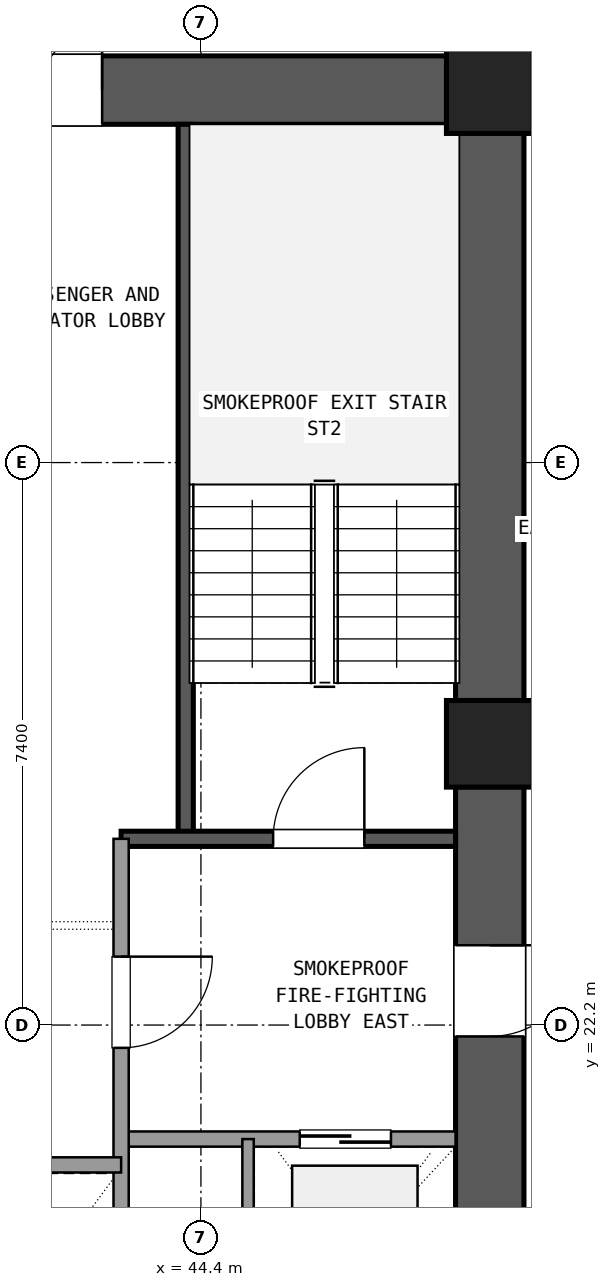
"""IFC4 building model, lengths in metres.
Left out: names, types, materials, properties, quantities, classifications, styles, units other than length and angle.
Written with IfcOpenShell. Run it as: python <this file> out.ifc"""

import sys

from ifc_helpers import new_model, si_unit, direction, frame, frame_2d, origin, origin_2d, place, context, subcontext, project, spatial, rectangle, extrude, element, fill, save


model = new_model("IFC4")
c1 = context("Model", 3, precision=1e-05, world=origin(), true_north=direction((0.0, 1.0)))
c2 = subcontext(c1, "Body", "Model", "MODEL_VIEW")
j1 = project(units=[si_unit("LENGTHUNIT", "METRE"), si_unit("PLANEANGLEUNIT", "RADIAN")], contexts=[c1])
p1 = place(None, origin())
s1 = spatial("IfcSite", under=j1, at=p1, CompositionType="ELEMENT")
p2 = place(p1, origin())
s2 = spatial("IfcBuilding", under=s1, at=p2, CompositionType="ELEMENT")
p3 = place(p2, frame((0.0, 0.0, 49.14)))
s3 = spatial("IfcBuildingStorey", under=s2, at=p3, CompositionType="ELEMENT", Elevation=49.14)
for number, where, z_axis, x_axis in (
    (1, (48.2, 25.9, 0.0), (0.0, 0.0, 1.0), (1.0, 0.0, 0.0)),
    (2, (48.2, 34.5, 0.0), (0.0, 0.0, 1.0), (1.0, 0.0, 0.0)),
):
    element("IfcColumn", number, at=place(p3, frame(where, z_axis=z_axis, x_axis=x_axis)), inside=s3, PredefinedType="COLUMN", context=c2, shape_type="SweptSolid", body=[
        extrude(rectangle(XDim=1.14, YDim=1.14, at=origin_2d()), origin(), (0.0, 0.0, 1.0), 3.6),
    ])
p4 = place(p3, frame((48.2, 17.865, 0.0), z_axis=(0.0, 0.0, 1.0), x_axis=(0.0, 1.0, 0.0)))
e3 = element("IfcWall", 3, at=p4, inside=s3, PredefinedType="SHEAR", context=c2, shape_type="SweptSolid", body=[
    extrude(rectangle(XDim=7.47, YDim=0.9, at=frame_2d((3.735, 0.0))), origin(), (0.0, 0.0, 1.0), 3.32),
])
p5 = place(p4, frame((4.185, 0.0, 0.0)))
e4 = element("IfcOpeningElement", 4, at=p5, cuts=e3, PredefinedType="OPENING", context=c2, shape_type="SweptSolid", body=[
    extrude(rectangle(XDim=1.2, YDim=2.15, at=frame_2d((0.6, 1.075))), frame((0.0, 0.46, 0.0), z_axis=(0.0, -1.0, 0.0), x_axis=(1.0, 0.0, 0.0)), (0.0, 0.0, 1.0), 0.92),
])
p6 = place(p3, frame((48.2, 26.465, 0.0), z_axis=(0.0, 0.0, 1.0), x_axis=(0.0, 1.0, 0.0)))
e5 = element("IfcWall", 5, at=p6, inside=s3, PredefinedType="SHEAR", context=c2, shape_type="SweptSolid", body=[
    extrude(rectangle(XDim=7.47, YDim=0.9, at=frame_2d((3.735, 0.0))), origin(), (0.0, 0.0, 1.0), 3.32),
])
p7 = place(p3, frame((47.635, 34.5, 0.0), z_axis=(0.0, 0.0, 1.0), x_axis=(-1.0, 0.0, 0.0)))
e6 = element("IfcWall", 6, at=p7, inside=s3, PredefinedType="SHEAR", context=c2, shape_type="SweptSolid", body=[
    extrude(rectangle(XDim=10.07, YDim=0.9, at=frame_2d((5.035, 0.0))), origin(), (0.0, 0.0, 1.0), 3.32),
])
p8 = place(p7, frame((4.535, 0.0, 0.0)))
e7 = element("IfcOpeningElement", 7, at=p8, cuts=e6, PredefinedType="OPENING", context=c2, shape_type="SweptSolid", body=[
    extrude(rectangle(XDim=1.6, YDim=2.2, at=frame_2d((0.8, 1.1))), frame((0.0, 0.46, 0.0), z_axis=(0.0, -1.0, 0.0), x_axis=(1.0, 0.0, 0.0)), (0.0, 0.0, 1.0), 0.92),
])
p9 = place(p3, frame((44.2, 24.65, 0.0), z_axis=(0.0, 0.0, 1.0), x_axis=(0.0, 1.0, 0.0)))
e8 = element("IfcWall", 8, at=p9, inside=s3, PredefinedType="SHEAR", context=c2, shape_type="SweptSolid", body=[
    extrude(rectangle(XDim=9.4, YDim=0.2, at=frame_2d((4.7, 0.0))), origin(), (0.0, 0.0, 1.0), 3.32),
])
p10 = place(p3, frame((43.35, 24.65, 0.0), z_axis=(0.0, 0.0, 1.0), x_axis=(1.0, 0.0, 0.0)))
e9 = element("IfcWall", 9, at=p10, inside=s3, PredefinedType="SHEAR", context=c2, shape_type="SweptSolid", body=[
    extrude(rectangle(XDim=4.4, YDim=0.2, at=frame_2d((2.2, 0.0))), origin(), (0.0, 0.0, 1.0), 3.32),
])
p11 = place(p10, frame((2.0, 0.0, 0.0)))
e10 = element("IfcOpeningElement", 10, at=p11, cuts=e9, PredefinedType="OPENING", context=c2, shape_type="SweptSolid", body=[
    extrude(rectangle(XDim=1.2, YDim=2.15, at=frame_2d((0.6, 1.075))), frame((0.0, 0.11, 0.0), z_axis=(0.0, -1.0, 0.0), x_axis=(1.0, 0.0, 0.0)), (0.0, 0.0, 1.0), 0.22),
])
p12 = place(p3, frame((43.35, 20.7, 0.0), z_axis=(0.0, 0.0, 1.0), x_axis=(1.0, 0.0, 0.0)))
e11 = element("IfcWall", 11, at=p12, inside=s3, PredefinedType="SOLIDWALL", context=c2, shape_type="SweptSolid", body=[
    extrude(rectangle(XDim=4.4, YDim=0.2, at=frame_2d((2.2, 0.0))), origin(), (0.0, 0.0, 1.0), 2.61),
])
p13 = place(p12, frame((2.35, 0.0, 0.0)))
e12 = element("IfcOpeningElement", 12, at=p13, cuts=e11, PredefinedType="OPENING", context=c2, shape_type="SweptSolid", body=[
    extrude(rectangle(XDim=1.2, YDim=2.15, at=frame_2d((0.6, 1.075))), frame((0.0, 0.11, 0.0), z_axis=(0.0, -1.0, 0.0), x_axis=(1.0, 0.0, 0.0)), (0.0, 0.0, 1.0), 0.22),
])
p14 = place(p3, frame((43.35, 17.75, 0.0), z_axis=(0.0, 0.0, 1.0), x_axis=(0.0, 1.0, 0.0)))
e13 = element("IfcWall", 13, at=p14, inside=s3, PredefinedType="SOLIDWALL", context=c2, shape_type="SweptSolid", body=[
    extrude(rectangle(XDim=6.9, YDim=0.2, at=frame_2d((3.45, 0.0))), origin(), (0.0, 0.0, 1.0), 2.61),
])
p15 = place(p14, frame((4.15, 0.0, 0.0)))
e14 = element("IfcOpeningElement", 14, at=p15, cuts=e13, PredefinedType="OPENING", context=c2, shape_type="SweptSolid", body=[
    extrude(rectangle(XDim=1.2, YDim=2.15, at=frame_2d((0.6, 1.075))), frame((0.0, 0.11, 0.0), z_axis=(0.0, -1.0, 0.0), x_axis=(1.0, 0.0, 0.0)), (0.0, 0.0, 1.0), 0.22),
])
p16 = place(p3, frame((45.02, 17.75, 0.0), z_axis=(0.0, 0.0, 1.0), x_axis=(0.0, 1.0, 0.0)))
e15 = element("IfcWall", 15, at=p16, inside=s3, PredefinedType="PARTITIONING", context=c2, shape_type="SweptSolid", body=[
    extrude(rectangle(XDim=2.95, YDim=0.15, at=frame_2d((1.475, 0.0))), origin(), (0.0, 0.0, 1.0), 2.61),
])
p17 = place(p3, frame((37.25, 20.36, 0.0), z_axis=(0.0, 0.0, 1.0), x_axis=(1.0, 0.0, 0.0)))
e16 = element("IfcWall", 16, at=p17, inside=s3, PredefinedType="SOLIDWALL", context=c2, shape_type="SweptSolid", body=[
    extrude(rectangle(XDim=6.1, YDim=0.2, at=frame_2d((3.05, 0.0))), origin(), (0.0, 0.0, 1.0), 2.61),
])
p18 = place(p11, origin())
e17 = element("IfcDoor", 17, at=p18, inside=s3, OperationType="SINGLE_SWING_RIGHT", PredefinedType="DOOR", context=c2, shape_type="SweptSolid", body=[
    extrude(rectangle(XDim=1.2, YDim=2.15, at=frame_2d((0.6, 1.075))), frame((0.0, 0.025, 0.0), z_axis=(0.0, -1.0, 0.0), x_axis=(1.0, 0.0, 0.0)), (0.0, 0.0, 1.0), 0.05),
])
fill(e10, e17)
p19 = place(p13, origin())
e18 = element("IfcDoor", 18, at=p19, inside=s3, OperationType="SLIDING_TO_RIGHT", PredefinedType="DOOR", context=c2, shape_type="SweptSolid", body=[
    extrude(rectangle(XDim=1.2, YDim=2.15, at=frame_2d((0.6, 1.075))), frame((0.0, 0.025, 0.0), z_axis=(0.0, -1.0, 0.0), x_axis=(1.0, 0.0, 0.0)), (0.0, 0.0, 1.0), 0.05),
])
fill(e12, e18)
p20 = place(p15, frame((1.2, 0.0, 0.0), z_axis=(0.0, 0.0, 1.0), x_axis=(-1.0, 0.0, 0.0)))
e19 = element("IfcDoor", 19, at=p20, inside=s3, OperationType="SINGLE_SWING_RIGHT", PredefinedType="DOOR", context=c2, shape_type="SweptSolid", body=[
    extrude(rectangle(XDim=1.2, YDim=2.15, at=frame_2d((0.6, 1.075))), frame((0.0, 0.025, 0.0), z_axis=(0.0, -1.0, 0.0), x_axis=(1.0, 0.0, 0.0)), (0.0, 0.0, 1.0), 0.05),
])
fill(e14, e19)
p21 = place(p5, frame((1.2, 0.0, 0.0), z_axis=(0.0, 0.0, 1.0), x_axis=(-1.0, 0.0, 0.0)))
e20 = element("IfcDoor", 20, at=p21, inside=s3, OperationType="SINGLE_SWING_RIGHT", PredefinedType="DOOR", context=c2, shape_type="SweptSolid", body=[
    extrude(rectangle(XDim=1.2, YDim=2.15, at=frame_2d((0.6, 1.075))), frame((0.0, 0.025, 0.0), z_axis=(0.0, -1.0, 0.0), x_axis=(1.0, 0.0, 0.0)), (0.0, 0.0, 1.0), 0.05),
])
fill(e4, e20)
p22 = place(p8, frame((1.6, 0.0, 0.0), z_axis=(0.0, 0.0, 1.0), x_axis=(-1.0, 0.0, 0.0)))
e21 = element("IfcDoor", 21, at=p22, inside=s3, OperationType="DOUBLE_DOOR_SINGLE_SWING", PredefinedType="DOOR", context=c2, shape_type="SweptSolid", body=[
    extrude(rectangle(XDim=1.6, YDim=2.2, at=frame_2d((0.8, 1.1))), frame((0.0, 0.025, 0.0), z_axis=(0.0, -1.0, 0.0), x_axis=(1.0, 0.0, 0.0)), (0.0, 0.0, 1.0), 0.05),
])
fill(e7, e21)
save(model, sys.argv[1])
